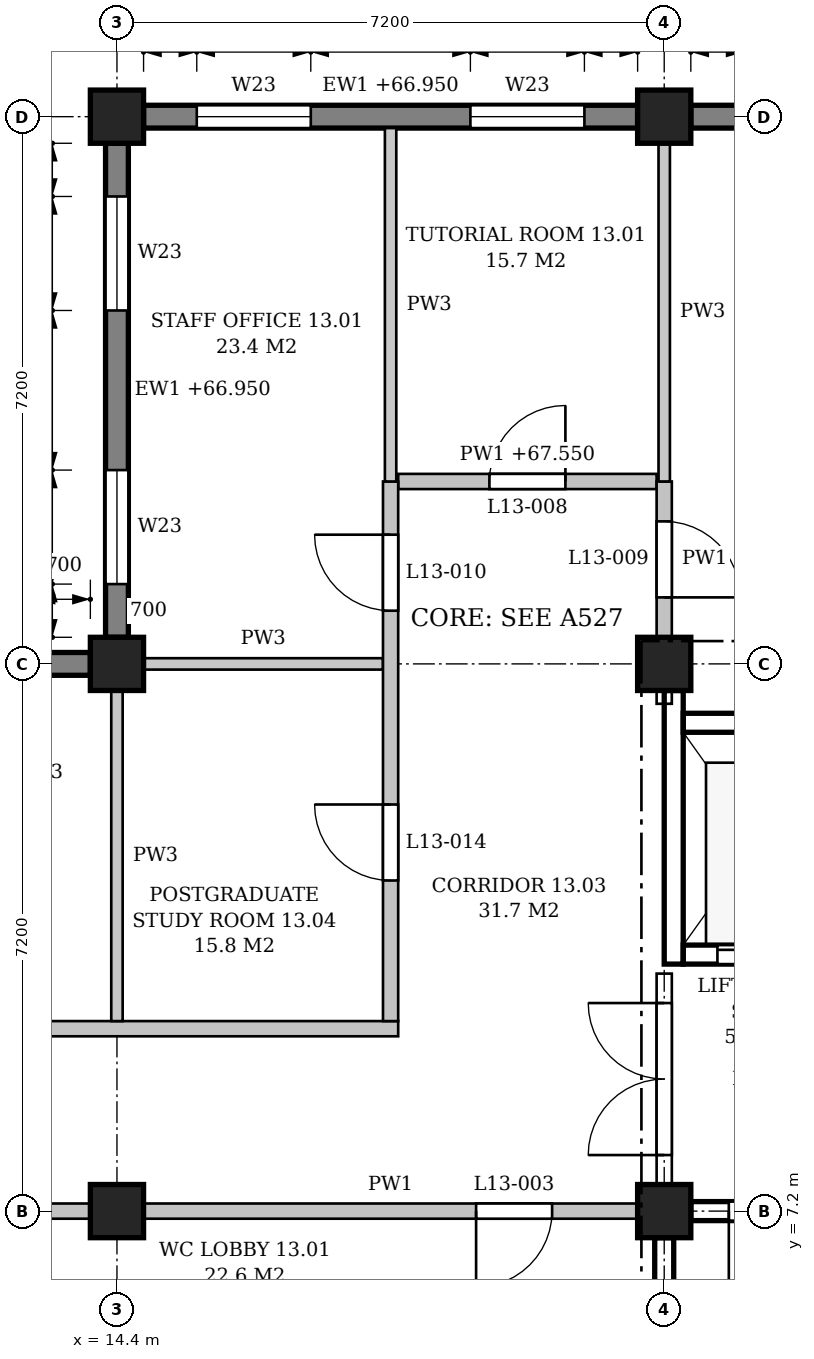
"""IFC4 building model, lengths in metres.
Left out: names, types, materials, properties, quantities, classifications, styles, units other than length and angle.
Written with IfcOpenShell. Run it as: python <this file> out.ifc"""

import sys

from ifc_helpers import new_model, si_unit, direction, frame, frame_2d, origin, origin_2d, place, context, subcontext, project, spatial, polyline, rectangle, outline, extrude, element, fill, save


model = new_model("IFC4")
c1 = context("Model", 3, precision=1e-05, world=origin(), true_north=direction((0.0, 1.0)))
c2 = subcontext(c1, "Body", "Model", "MODEL_VIEW")
j1 = project(units=[si_unit("LENGTHUNIT", "METRE"), si_unit("PLANEANGLEUNIT", "RADIAN")], contexts=[c1])
p1 = place(None, origin())
s1 = spatial("IfcSite", under=j1, at=p1, CompositionType="ELEMENT")
p2 = place(p1, origin())
s2 = spatial("IfcBuilding", under=s1, at=p2, CompositionType="ELEMENT")
p3 = place(p2, frame((0.0, 0.0, 63.3)))
s3 = spatial("IfcBuildingStorey", under=s2, at=p3, CompositionType="ELEMENT", Elevation=63.3)
for number, where, z_axis, x_axis in (
    (1, (14.4, 7.2, 0.0), (0.0, 0.0, 1.0), (1.0, 0.0, 0.0)),
    (2, (14.4, 14.4, 0.0), (0.0, 0.0, 1.0), (1.0, 0.0, 0.0)),
    (3, (14.4, 21.6, 0.0), (0.0, 0.0, 1.0), (1.0, 0.0, 0.0)),
    (4, (21.6, 7.2, 0.0), (0.0, 0.0, 1.0), (1.0, 0.0, 0.0)),
    (5, (21.6, 14.4, 0.0), (0.0, 0.0, 1.0), (1.0, 0.0, 0.0)),
    (6, (21.6, 21.6, 0.0), (0.0, 0.0, 1.0), (1.0, 0.0, 0.0)),
):
    element("IfcColumn", number, at=place(p3, frame(where, z_axis=z_axis, x_axis=x_axis)), inside=s3, PredefinedType="COLUMN", context=c2, shape_type="SweptSolid", body=[
        extrude(rectangle(XDim=0.7, YDim=0.7, at=origin_2d()), origin(), (0.0, 0.0, 1.0), 4.5),
    ])
p4 = place(p3, frame((28.45, 21.6, 0.0), z_axis=(0.0, 0.0, 1.0), x_axis=(-1.0, 0.0, 0.0)))
e7 = element("IfcWall", 7, at=p4, inside=s3, PredefinedType="STANDARD", context=c2, shape_type="SweptSolid", body=[
    extrude(rectangle(XDim=6.5, YDim=0.3, at=frame_2d((3.25, 0.0))), origin(), (0.0, 0.0, 1.0), 3.65),
])
p5 = place(p4, frame((0.7, 0.0, 0.9)))
e8 = element("IfcOpeningElement", 8, at=p5, cuts=e7, PredefinedType="OPENING", context=c2, shape_type="SweptSolid", body=[
    extrude(outline(polyline([(0.0, 0.0), (1.5, 0.0), (1.5, 1.95), (0.75, 2.7), (0.0, 1.95), (0.0, 0.0)])), frame((0.0, 0.16, 0.0), z_axis=(0.0, -1.0, 0.0), x_axis=(1.0, 0.0, 0.0)), (0.0, 0.0, 1.0), 0.32),
])
p6 = place(p4, frame((4.3, 0.0, 0.9)))
e9 = element("IfcOpeningElement", 9, at=p6, cuts=e7, PredefinedType="OPENING", context=c2, shape_type="SweptSolid", body=[
    extrude(outline(polyline([(0.0, 0.0), (1.5, 0.0), (1.5, 1.95), (0.75, 2.7), (0.0, 1.95), (0.0, 0.0)])), frame((0.0, 0.16, 0.0), z_axis=(0.0, -1.0, 0.0), x_axis=(1.0, 0.0, 0.0)), (0.0, 0.0, 1.0), 0.32),
])
p7 = place(p3, frame((21.25, 21.6, 0.0), z_axis=(0.0, 0.0, 1.0), x_axis=(-1.0, 0.0, 0.0)))
e10 = element("IfcWall", 10, at=p7, inside=s3, PredefinedType="STANDARD", context=c2, shape_type="SweptSolid", body=[
    extrude(rectangle(XDim=6.5, YDim=0.3, at=frame_2d((3.25, 0.0))), origin(), (0.0, 0.0, 1.0), 3.65),
])
p8 = place(p7, frame((0.7, 0.0, 0.9)))
e11 = element("IfcOpeningElement", 11, at=p8, cuts=e10, PredefinedType="OPENING", context=c2, shape_type="SweptSolid", body=[
    extrude(outline(polyline([(0.0, 0.0), (1.5, 0.0), (1.5, 1.95), (0.75, 2.7), (0.0, 1.95), (0.0, 0.0)])), frame((0.0, 0.16, 0.0), z_axis=(0.0, -1.0, 0.0), x_axis=(1.0, 0.0, 0.0)), (0.0, 0.0, 1.0), 0.32),
])
p9 = place(p7, frame((4.3, 0.0, 0.9)))
e12 = element("IfcOpeningElement", 12, at=p9, cuts=e10, PredefinedType="OPENING", context=c2, shape_type="SweptSolid", body=[
    extrude(outline(polyline([(0.0, 0.0), (1.5, 0.0), (1.5, 1.95), (0.75, 2.7), (0.0, 1.95), (0.0, 0.0)])), frame((0.0, 0.16, 0.0), z_axis=(0.0, -1.0, 0.0), x_axis=(1.0, 0.0, 0.0)), (0.0, 0.0, 1.0), 0.32),
])
p10 = place(p3, frame((14.05, 14.4, 0.0), z_axis=(0.0, 0.0, 1.0), x_axis=(-1.0, 0.0, 0.0)))
e13 = element("IfcWall", 13, at=p10, inside=s3, PredefinedType="STANDARD", context=c2, shape_type="SweptSolid", body=[
    extrude(rectangle(XDim=6.5, YDim=0.3, at=frame_2d((3.25, 0.0))), origin(), (0.0, 0.0, 1.0), 3.65),
])
p11 = place(p10, frame((0.7, 0.0, 0.9)))
e14 = element("IfcOpeningElement", 14, at=p11, cuts=e13, PredefinedType="OPENING", context=c2, shape_type="SweptSolid", body=[
    extrude(outline(polyline([(0.0, 0.0), (1.5, 0.0), (1.5, 1.95), (0.75, 2.7), (0.0, 1.95), (0.0, 0.0)])), frame((0.0, 0.16, 0.0), z_axis=(0.0, -1.0, 0.0), x_axis=(1.0, 0.0, 0.0)), (0.0, 0.0, 1.0), 0.32),
])
p12 = place(p10, frame((4.3, 0.0, 0.9)))
e15 = element("IfcOpeningElement", 15, at=p12, cuts=e13, PredefinedType="OPENING", context=c2, shape_type="SweptSolid", body=[
    extrude(outline(polyline([(0.0, 0.0), (1.5, 0.0), (1.5, 1.95), (0.75, 2.7), (0.0, 1.95), (0.0, 0.0)])), frame((0.0, 0.16, 0.0), z_axis=(0.0, -1.0, 0.0), x_axis=(1.0, 0.0, 0.0)), (0.0, 0.0, 1.0), 0.32),
])
p13 = place(p3, frame((14.4, 14.75, 0.0), z_axis=(0.0, 0.0, 1.0), x_axis=(0.0, 1.0, 0.0)))
e16 = element("IfcWall", 16, at=p13, inside=s3, PredefinedType="STANDARD", context=c2, shape_type="SweptSolid", body=[
    extrude(rectangle(XDim=6.5, YDim=0.3, at=frame_2d((3.25, 0.0))), origin(), (0.0, 0.0, 1.0), 3.65),
])
p14 = place(p13, frame((0.7, 0.0, 0.9)))
e17 = element("IfcOpeningElement", 17, at=p14, cuts=e16, PredefinedType="OPENING", context=c2, shape_type="SweptSolid", body=[
    extrude(outline(polyline([(0.0, 0.0), (1.5, 0.0), (1.5, 1.95), (0.75, 2.7), (0.0, 1.95), (0.0, 0.0)])), frame((0.0, 0.16, 0.0), z_axis=(0.0, -1.0, 0.0), x_axis=(1.0, 0.0, 0.0)), (0.0, 0.0, 1.0), 0.32),
])
p15 = place(p13, frame((4.3, 0.0, 0.9)))
e18 = element("IfcOpeningElement", 18, at=p15, cuts=e16, PredefinedType="OPENING", context=c2, shape_type="SweptSolid", body=[
    extrude(outline(polyline([(0.0, 0.0), (1.5, 0.0), (1.5, 1.95), (0.75, 2.7), (0.0, 1.95), (0.0, 0.0)])), frame((0.0, 0.16, 0.0), z_axis=(0.0, -1.0, 0.0), x_axis=(1.0, 0.0, 0.0)), (0.0, 0.0, 1.0), 0.32),
])
p16 = place(p3, frame((21.95, 7.2, 0.0), z_axis=(0.0, 0.0, 1.0), x_axis=(1.0, 0.0, 0.0)))
e19 = element("IfcWall", 19, at=p16, inside=s3, PredefinedType="SHEAR", context=c2, shape_type="SweptSolid", body=[
    extrude(rectangle(XDim=6.5, YDim=0.25, at=frame_2d((3.25, 0.0))), origin(), (0.0, 0.0, 1.0), 3.6),
])
p17 = place(p16, frame((0.5, 0.0, 0.0)))
e20 = element("IfcOpeningElement", 20, at=p17, cuts=e19, PredefinedType="OPENING", context=c2, shape_type="SweptSolid", body=[
    extrude(rectangle(XDim=1.1, YDim=2.1, at=frame_2d((0.55, 1.05))), frame((0.0, 0.135, 0.0), z_axis=(0.0, -1.0, 0.0), x_axis=(1.0, 0.0, 0.0)), (0.0, 0.0, 1.0), 0.27),
])
p18 = place(p3, frame((21.6, 0.35, 0.0), z_axis=(0.0, 0.0, 1.0), x_axis=(0.0, 1.0, 0.0)))
e21 = element("IfcWall", 21, at=p18, inside=s3, PredefinedType="SHEAR", context=c2, shape_type="SweptSolid", body=[
    extrude(rectangle(XDim=6.5, YDim=0.25, at=frame_2d((3.25, 0.0))), origin(), (0.0, 0.0, 1.0), 3.6),
])
p19 = place(p3, frame((21.725, 10.45, -0.25), z_axis=(0.0, 0.0, 1.0), x_axis=(0.0, 1.0, 0.0)))
e22 = element("IfcWall", 22, at=p19, inside=s3, PredefinedType="SHEAR", context=c2, shape_type="SweptSolid", body=[
    extrude(rectangle(XDim=3.6, YDim=0.25, at=frame_2d((1.8, 0.0))), origin(), (0.0, 0.0, 1.0), 3.85),
])
p20 = place(p3, frame((21.85, 10.575, -0.25), z_axis=(0.0, 0.0, 1.0), x_axis=(1.0, 0.0, 0.0)))
e23 = element("IfcWall", 23, at=p20, inside=s3, PredefinedType="SHEAR", context=c2, shape_type="SweptSolid", body=[
    extrude(rectangle(XDim=2.0, YDim=0.25, at=frame_2d((1.0, 0.0))), origin(), (0.0, 0.0, 1.0), 4.5),
])
p21 = place(p20, frame((0.45, 0.0, 0.25)))
e24 = element("IfcOpeningElement", 24, at=p21, cuts=e23, PredefinedType="OPENING", context=c2, shape_type="SweptSolid", body=[
    extrude(rectangle(XDim=1.1, YDim=2.1, at=frame_2d((0.55, 1.05))), frame((0.0, 0.135, 0.0), z_axis=(0.0, -1.0, 0.0), x_axis=(1.0, 0.0, 0.0)), (0.0, 0.0, 1.0), 0.27),
])
p22 = place(p3, frame((21.85, 13.625, -0.25), z_axis=(0.0, 0.0, 1.0), x_axis=(1.0, 0.0, 0.0)))
e25 = element("IfcWall", 25, at=p22, inside=s3, PredefinedType="SHEAR", context=c2, shape_type="SweptSolid", body=[
    extrude(rectangle(XDim=2.0, YDim=0.25, at=frame_2d((1.0, 0.0))), origin(), (0.0, 0.0, 1.0), 4.5),
])
p23 = place(p3, frame((7.55, 7.2, 0.0), z_axis=(0.0, 0.0, 1.0), x_axis=(1.0, 0.0, 0.0)))
e26 = element("IfcWall", 26, at=p23, inside=s3, PredefinedType="PARTITIONING", context=c2, shape_type="SweptSolid", body=[
    extrude(rectangle(XDim=6.5, YDim=0.2, at=frame_2d((3.25, 0.0))), origin(), (0.0, 0.0, 1.0), 3.6),
])
p24 = place(p23, frame((2.75, 0.0, 0.0)))
e27 = element("IfcOpeningElement", 27, at=p24, cuts=e26, PredefinedType="OPENING", context=c2, shape_type="SweptSolid", body=[
    extrude(rectangle(XDim=1.0, YDim=2.1, at=frame_2d((0.5, 1.05))), frame((0.0, 0.11, 0.0), z_axis=(0.0, -1.0, 0.0), x_axis=(1.0, 0.0, 0.0)), (0.0, 0.0, 1.0), 0.22),
])
p25 = place(p3, frame((14.75, 7.2, 0.0), z_axis=(0.0, 0.0, 1.0), x_axis=(1.0, 0.0, 0.0)))
e28 = element("IfcWall", 28, at=p25, inside=s3, PredefinedType="PARTITIONING", context=c2, shape_type="SweptSolid", body=[
    extrude(rectangle(XDim=6.5, YDim=0.2, at=frame_2d((3.25, 0.0))), origin(), (0.0, 0.0, 1.0), 3.6),
])
p26 = place(p25, frame((4.375, 0.0, 0.0)))
e29 = element("IfcOpeningElement", 29, at=p26, cuts=e28, PredefinedType="OPENING", context=c2, shape_type="SweptSolid", body=[
    extrude(rectangle(XDim=1.0, YDim=2.1, at=frame_2d((0.5, 1.05))), frame((0.0, 0.11, 0.0), z_axis=(0.0, -1.0, 0.0), x_axis=(1.0, 0.0, 0.0)), (0.0, 0.0, 1.0), 0.22),
])
p27 = place(p3, frame((3.5, 9.6, 0.0), z_axis=(0.0, 0.0, 1.0), x_axis=(1.0, 0.0, 0.0)))
e30 = element("IfcWall", 30, at=p27, inside=s3, PredefinedType="PARTITIONING", context=c2, shape_type="SweptSolid", body=[
    extrude(outline(polyline([(0.0, 0.0), (14.6, 0.0), (14.6, 4.25), (11.1, 4.25), (11.1, 3.6), (10.7, 3.6), (10.7, 4.25), (3.9, 4.25), (3.9, 3.6), (3.5, 3.6), (3.5, 4.25), (0.0, 4.25), (0.0, 0.0)])), frame((0.0, 0.1, 0.0), z_axis=(0.0, -1.0, 0.0), x_axis=(1.0, 0.0, 0.0)), (0.0, 0.0, 1.0), 0.2),
])
p28 = place(p27, frame((2.7, 0.0, 0.0)))
e31 = element("IfcOpeningElement", 31, at=p28, cuts=e30, PredefinedType="OPENING", context=c2, shape_type="SweptSolid", body=[
    extrude(rectangle(XDim=2.0, YDim=2.1, at=frame_2d((1.0, 1.05))), frame((0.0, 0.11, 0.0), z_axis=(0.0, -1.0, 0.0), x_axis=(1.0, 0.0, 0.0)), (0.0, 0.0, 1.0), 0.22),
])
p29 = place(p27, frame((8.6, 0.0, 0.0)))
e32 = element("IfcOpeningElement", 32, at=p29, cuts=e30, PredefinedType="OPENING", context=c2, shape_type="SweptSolid", body=[
    extrude(rectangle(XDim=1.0, YDim=2.1, at=frame_2d((0.5, 1.05))), frame((0.0, 0.11, 0.0), z_axis=(0.0, -1.0, 0.0), x_axis=(1.0, 0.0, 0.0)), (0.0, 0.0, 1.0), 0.22),
])
p30 = place(p3, frame((14.75, 14.4, 0.0), z_axis=(0.0, 0.0, 1.0), x_axis=(1.0, 0.0, 0.0)))
e33 = element("IfcWall", 33, at=p30, inside=s3, PredefinedType="PARTITIONING", context=c2, shape_type="SweptSolid", body=[
    extrude(rectangle(XDim=3.15, YDim=0.15, at=frame_2d((1.575, 0.0))), origin(), (0.0, 0.0, 1.0), 3.6),
])
p31 = place(p3, frame((18.1, 16.8, 0.0), z_axis=(0.0, 0.0, 1.0), x_axis=(1.0, 0.0, 0.0)))
e34 = element("IfcWall", 34, at=p31, inside=s3, PredefinedType="PARTITIONING", context=c2, shape_type="SweptSolid", body=[
    extrude(outline(polyline([(0.0, 0.0), (3.4, 0.0), (3.4, 3.6), (3.3, 3.6), (3.3, 4.25), (0.0, 4.25), (0.0, 0.0)])), frame((0.0, 0.1, 0.0), z_axis=(0.0, -1.0, 0.0), x_axis=(1.0, 0.0, 0.0)), (0.0, 0.0, 1.0), 0.2),
])
p32 = place(p31, frame((1.2, 0.0, 0.0)))
e35 = element("IfcOpeningElement", 35, at=p32, cuts=e34, PredefinedType="OPENING", context=c2, shape_type="SweptSolid", body=[
    extrude(rectangle(XDim=1.0, YDim=2.1, at=frame_2d((0.5, 1.05))), frame((0.0, 0.11, 0.0), z_axis=(0.0, -1.0, 0.0), x_axis=(1.0, 0.0, 0.0)), (0.0, 0.0, 1.0), 0.22),
])
p33 = place(p3, frame((14.4, 9.7, 0.0), z_axis=(0.0, 0.0, 1.0), x_axis=(0.0, 1.0, 0.0)))
e36 = element("IfcWall", 36, at=p33, inside=s3, PredefinedType="PARTITIONING", context=c2, shape_type="SweptSolid", body=[
    extrude(rectangle(XDim=4.35, YDim=0.15, at=frame_2d((2.175, 0.0))), origin(), (0.0, 0.0, 1.0), 3.6),
])
p34 = place(p3, frame((18.0, 9.7, 0.0), z_axis=(0.0, 0.0, 1.0), x_axis=(0.0, 1.0, 0.0)))
e37 = element("IfcWall", 37, at=p34, inside=s3, PredefinedType="PARTITIONING", context=c2, shape_type="SweptSolid", body=[
    extrude(outline(polyline([(0.0, 0.0), (7.1, 0.0), (7.1, 4.25), (4.9, 4.25), (4.9, 3.65), (4.5, 3.65), (4.5, 4.25), (0.0, 4.25), (0.0, 0.0)])), frame((0.0, 0.1, 0.0), z_axis=(0.0, -1.0, 0.0), x_axis=(1.0, 0.0, 0.0)), (0.0, 0.0, 1.0), 0.2),
])
p35 = place(p34, frame((5.4, 0.0, 0.0)))
e38 = element("IfcOpeningElement", 38, at=p35, cuts=e37, PredefinedType="OPENING", context=c2, shape_type="SweptSolid", body=[
    extrude(rectangle(XDim=1.0, YDim=2.1, at=frame_2d((0.5, 1.05))), frame((0.0, 0.11, 0.0), z_axis=(0.0, -1.0, 0.0), x_axis=(1.0, 0.0, 0.0)), (0.0, 0.0, 1.0), 0.22),
])
p36 = place(p34, frame((1.85, 0.0, 0.0)))
e39 = element("IfcOpeningElement", 39, at=p36, cuts=e37, PredefinedType="OPENING", context=c2, shape_type="SweptSolid", body=[
    extrude(rectangle(XDim=1.0, YDim=2.1, at=frame_2d((0.5, 1.05))), frame((0.0, 0.11, 0.0), z_axis=(0.0, -1.0, 0.0), x_axis=(1.0, 0.0, 0.0)), (0.0, 0.0, 1.0), 0.22),
])
p37 = place(p3, frame((18.0, 16.8, 0.0), z_axis=(0.0, 0.0, 1.0), x_axis=(0.0, 1.0, 0.0)))
e40 = element("IfcWall", 40, at=p37, inside=s3, PredefinedType="PARTITIONING", context=c2, shape_type="SweptSolid", body=[
    extrude(rectangle(XDim=4.65, YDim=0.15, at=frame_2d((2.325, 0.0))), origin(), (0.0, 0.0, 1.0), 3.6),
])
p38 = place(p3, frame((21.6, 7.55, 0.0), z_axis=(0.0, 0.0, 1.0), x_axis=(0.0, 1.0, 0.0)))
e41 = element("IfcWall", 41, at=p38, inside=s3, PredefinedType="PARTITIONING", context=c2, shape_type="SweptSolid", body=[
    extrude(rectangle(XDim=2.775, YDim=0.2, at=frame_2d((1.387, 0.0))), origin(), (0.0, 0.0, 1.0), 3.6),
])
p39 = place(p38, frame((0.387, 0.0, 0.0)))
e42 = element("IfcOpeningElement", 42, at=p39, cuts=e41, PredefinedType="OPENING", context=c2, shape_type="SweptSolid", body=[
    extrude(rectangle(XDim=2.0, YDim=2.4, at=frame_2d((1.0, 1.2))), frame((0.0, 0.11, 0.0), z_axis=(0.0, -1.0, 0.0), x_axis=(1.0, 0.0, 0.0)), (0.0, 0.0, 1.0), 0.22),
])
p40 = place(p3, frame((21.6, 13.875, 0.0), z_axis=(0.0, 0.0, 1.0), x_axis=(0.0, 1.0, 0.0)))
e43 = element("IfcWall", 43, at=p40, inside=s3, PredefinedType="PARTITIONING", context=c2, shape_type="SweptSolid", body=[
    extrude(rectangle(XDim=0.175, YDim=0.2, at=frame_2d((0.087, 0.0))), origin(), (0.0, 0.0, 1.0), 3.6),
])
p41 = place(p3, frame((21.6, 14.75, 0.0), z_axis=(0.0, 0.0, 1.0), x_axis=(0.0, 1.0, 0.0)))
e44 = element("IfcWall", 44, at=p41, inside=s3, PredefinedType="PARTITIONING", context=c2, shape_type="SweptSolid", body=[
    extrude(rectangle(XDim=2.05, YDim=0.2, at=frame_2d((1.025, 0.0))), origin(), (0.0, 0.0, 1.0), 3.6),
])
p42 = place(p41, frame((0.525, 0.0, 0.0)))
e45 = element("IfcOpeningElement", 45, at=p42, cuts=e44, PredefinedType="OPENING", context=c2, shape_type="SweptSolid", body=[
    extrude(rectangle(XDim=1.0, YDim=2.1, at=frame_2d((0.5, 1.05))), frame((0.0, 0.11, 0.0), z_axis=(0.0, -1.0, 0.0), x_axis=(1.0, 0.0, 0.0)), (0.0, 0.0, 1.0), 0.22),
])
p43 = place(p3, frame((21.6, 16.8, 0.0), z_axis=(0.0, 0.0, 1.0), x_axis=(0.0, 1.0, 0.0)))
e46 = element("IfcWall", 46, at=p43, inside=s3, PredefinedType="PARTITIONING", context=c2, shape_type="SweptSolid", body=[
    extrude(rectangle(XDim=4.45, YDim=0.15, at=frame_2d((2.225, 0.0))), origin(), (0.0, 0.0, 1.0), 3.6),
])
p44 = place(p8, origin())
e47 = element("IfcWindow", 47, at=p44, inside=s3, PartitioningType="SINGLE_PANEL", PredefinedType="WINDOW", context=c2, shape_type="SweptSolid", body=[
    extrude(outline(polyline([(0.0, 0.0), (1.5, 0.0), (1.5, 1.95), (0.75, 2.7), (0.0, 1.95), (0.0, 0.0)])), frame((0.0, 0.03, 0.0), z_axis=(0.0, -1.0, 0.0), x_axis=(1.0, 0.0, 0.0)), (0.0, 0.0, 1.0), 0.06),
])
fill(e11, e47)
p45 = place(p9, origin())
e48 = element("IfcWindow", 48, at=p45, inside=s3, PartitioningType="SINGLE_PANEL", PredefinedType="WINDOW", context=c2, shape_type="SweptSolid", body=[
    extrude(outline(polyline([(0.0, 0.0), (1.5, 0.0), (1.5, 1.95), (0.75, 2.7), (0.0, 1.95), (0.0, 0.0)])), frame((0.0, 0.03, 0.0), z_axis=(0.0, -1.0, 0.0), x_axis=(1.0, 0.0, 0.0)), (0.0, 0.0, 1.0), 0.06),
])
fill(e12, e48)
p46 = place(p14, origin())
e49 = element("IfcWindow", 49, at=p46, inside=s3, PartitioningType="SINGLE_PANEL", PredefinedType="WINDOW", context=c2, shape_type="SweptSolid", body=[
    extrude(outline(polyline([(0.0, 0.0), (1.5, 0.0), (1.5, 1.95), (0.75, 2.7), (0.0, 1.95), (0.0, 0.0)])), frame((0.0, 0.03, 0.0), z_axis=(0.0, -1.0, 0.0), x_axis=(1.0, 0.0, 0.0)), (0.0, 0.0, 1.0), 0.06),
])
fill(e17, e49)
p47 = place(p15, origin())
e50 = element("IfcWindow", 50, at=p47, inside=s3, PartitioningType="SINGLE_PANEL", PredefinedType="WINDOW", context=c2, shape_type="SweptSolid", body=[
    extrude(outline(polyline([(0.0, 0.0), (1.5, 0.0), (1.5, 1.95), (0.75, 2.7), (0.0, 1.95), (0.0, 0.0)])), frame((0.0, 0.03, 0.0), z_axis=(0.0, -1.0, 0.0), x_axis=(1.0, 0.0, 0.0)), (0.0, 0.0, 1.0), 0.06),
])
fill(e18, e50)
p48 = place(p17, frame((1.1, 0.0, 0.0), z_axis=(0.0, 0.0, 1.0), x_axis=(-1.0, 0.0, 0.0)))
e51 = element("IfcDoor", 51, at=p48, inside=s3, OperationType="SINGLE_SWING_RIGHT", PredefinedType="DOOR", context=c2, shape_type="SweptSolid", body=[
    extrude(rectangle(XDim=1.1, YDim=2.1, at=frame_2d((0.55, 1.05))), frame((0.0, 0.025, 0.0), z_axis=(0.0, -1.0, 0.0), x_axis=(1.0, 0.0, 0.0)), (0.0, 0.0, 1.0), 0.05),
])
fill(e20, e51)
p49 = place(p21, origin())
e52 = element("IfcDoor", 52, at=p49, inside=s3, OperationType="SLIDING_TO_LEFT", PredefinedType="DOOR", context=c2, shape_type="SweptSolid", body=[
    extrude(rectangle(XDim=1.1, YDim=2.1, at=frame_2d((0.55, 1.05))), frame((0.0, 0.025, 0.0), z_axis=(0.0, -1.0, 0.0), x_axis=(1.0, 0.0, 0.0)), (0.0, 0.0, 1.0), 0.05),
])
fill(e24, e52)
p50 = place(p39, origin())
e53 = element("IfcDoor", 53, at=p50, inside=s3, OperationType="DOUBLE_DOOR_SINGLE_SWING", PredefinedType="DOOR", context=c2, shape_type="SweptSolid", body=[
    extrude(rectangle(XDim=2.0, YDim=2.4, at=frame_2d((1.0, 1.2))), frame((0.0, 0.025, 0.0), z_axis=(0.0, -1.0, 0.0), x_axis=(1.0, 0.0, 0.0)), (0.0, 0.0, 1.0), 0.05),
])
fill(e42, e53)
p51 = place(p26, frame((1.0, 0.0, 0.0), z_axis=(0.0, 0.0, 1.0), x_axis=(-1.0, 0.0, 0.0)))
e54 = element("IfcDoor", 54, at=p51, inside=s3, OperationType="SINGLE_SWING_RIGHT", PredefinedType="DOOR", context=c2, shape_type="SweptSolid", body=[
    extrude(rectangle(XDim=1.0, YDim=2.1, at=frame_2d((0.5, 1.05))), frame((0.0, 0.025, 0.0), z_axis=(0.0, -1.0, 0.0), x_axis=(1.0, 0.0, 0.0)), (0.0, 0.0, 1.0), 0.05),
])
fill(e29, e54)
p52 = place(p32, origin())
e55 = element("IfcDoor", 55, at=p52, inside=s3, OperationType="SINGLE_SWING_RIGHT", PredefinedType="DOOR", context=c2, shape_type="SweptSolid", body=[
    extrude(rectangle(XDim=1.0, YDim=2.1, at=frame_2d((0.5, 1.05))), frame((0.0, 0.025, 0.0), z_axis=(0.0, -1.0, 0.0), x_axis=(1.0, 0.0, 0.0)), (0.0, 0.0, 1.0), 0.05),
])
fill(e35, e55)
p53 = place(p42, frame((1.0, 0.0, 0.0), z_axis=(0.0, 0.0, 1.0), x_axis=(-1.0, 0.0, 0.0)))
e56 = element("IfcDoor", 56, at=p53, inside=s3, OperationType="SINGLE_SWING_RIGHT", PredefinedType="DOOR", context=c2, shape_type="SweptSolid", body=[
    extrude(rectangle(XDim=1.0, YDim=2.1, at=frame_2d((0.5, 1.05))), frame((0.0, 0.025, 0.0), z_axis=(0.0, -1.0, 0.0), x_axis=(1.0, 0.0, 0.0)), (0.0, 0.0, 1.0), 0.05),
])
fill(e45, e56)
p54 = place(p35, origin())
e57 = element("IfcDoor", 57, at=p54, inside=s3, OperationType="SINGLE_SWING_RIGHT", PredefinedType="DOOR", context=c2, shape_type="SweptSolid", body=[
    extrude(rectangle(XDim=1.0, YDim=2.1, at=frame_2d((0.5, 1.05))), frame((0.0, 0.025, 0.0), z_axis=(0.0, -1.0, 0.0), x_axis=(1.0, 0.0, 0.0)), (0.0, 0.0, 1.0), 0.05),
])
fill(e38, e57)
p55 = place(p36, origin())
e58 = element("IfcDoor", 58, at=p55, inside=s3, OperationType="SINGLE_SWING_RIGHT", PredefinedType="DOOR", context=c2, shape_type="SweptSolid", body=[
    extrude(rectangle(XDim=1.0, YDim=2.1, at=frame_2d((0.5, 1.05))), frame((0.0, 0.025, 0.0), z_axis=(0.0, -1.0, 0.0), x_axis=(1.0, 0.0, 0.0)), (0.0, 0.0, 1.0), 0.05),
])
fill(e39, e58)
save(model, sys.argv[1])
